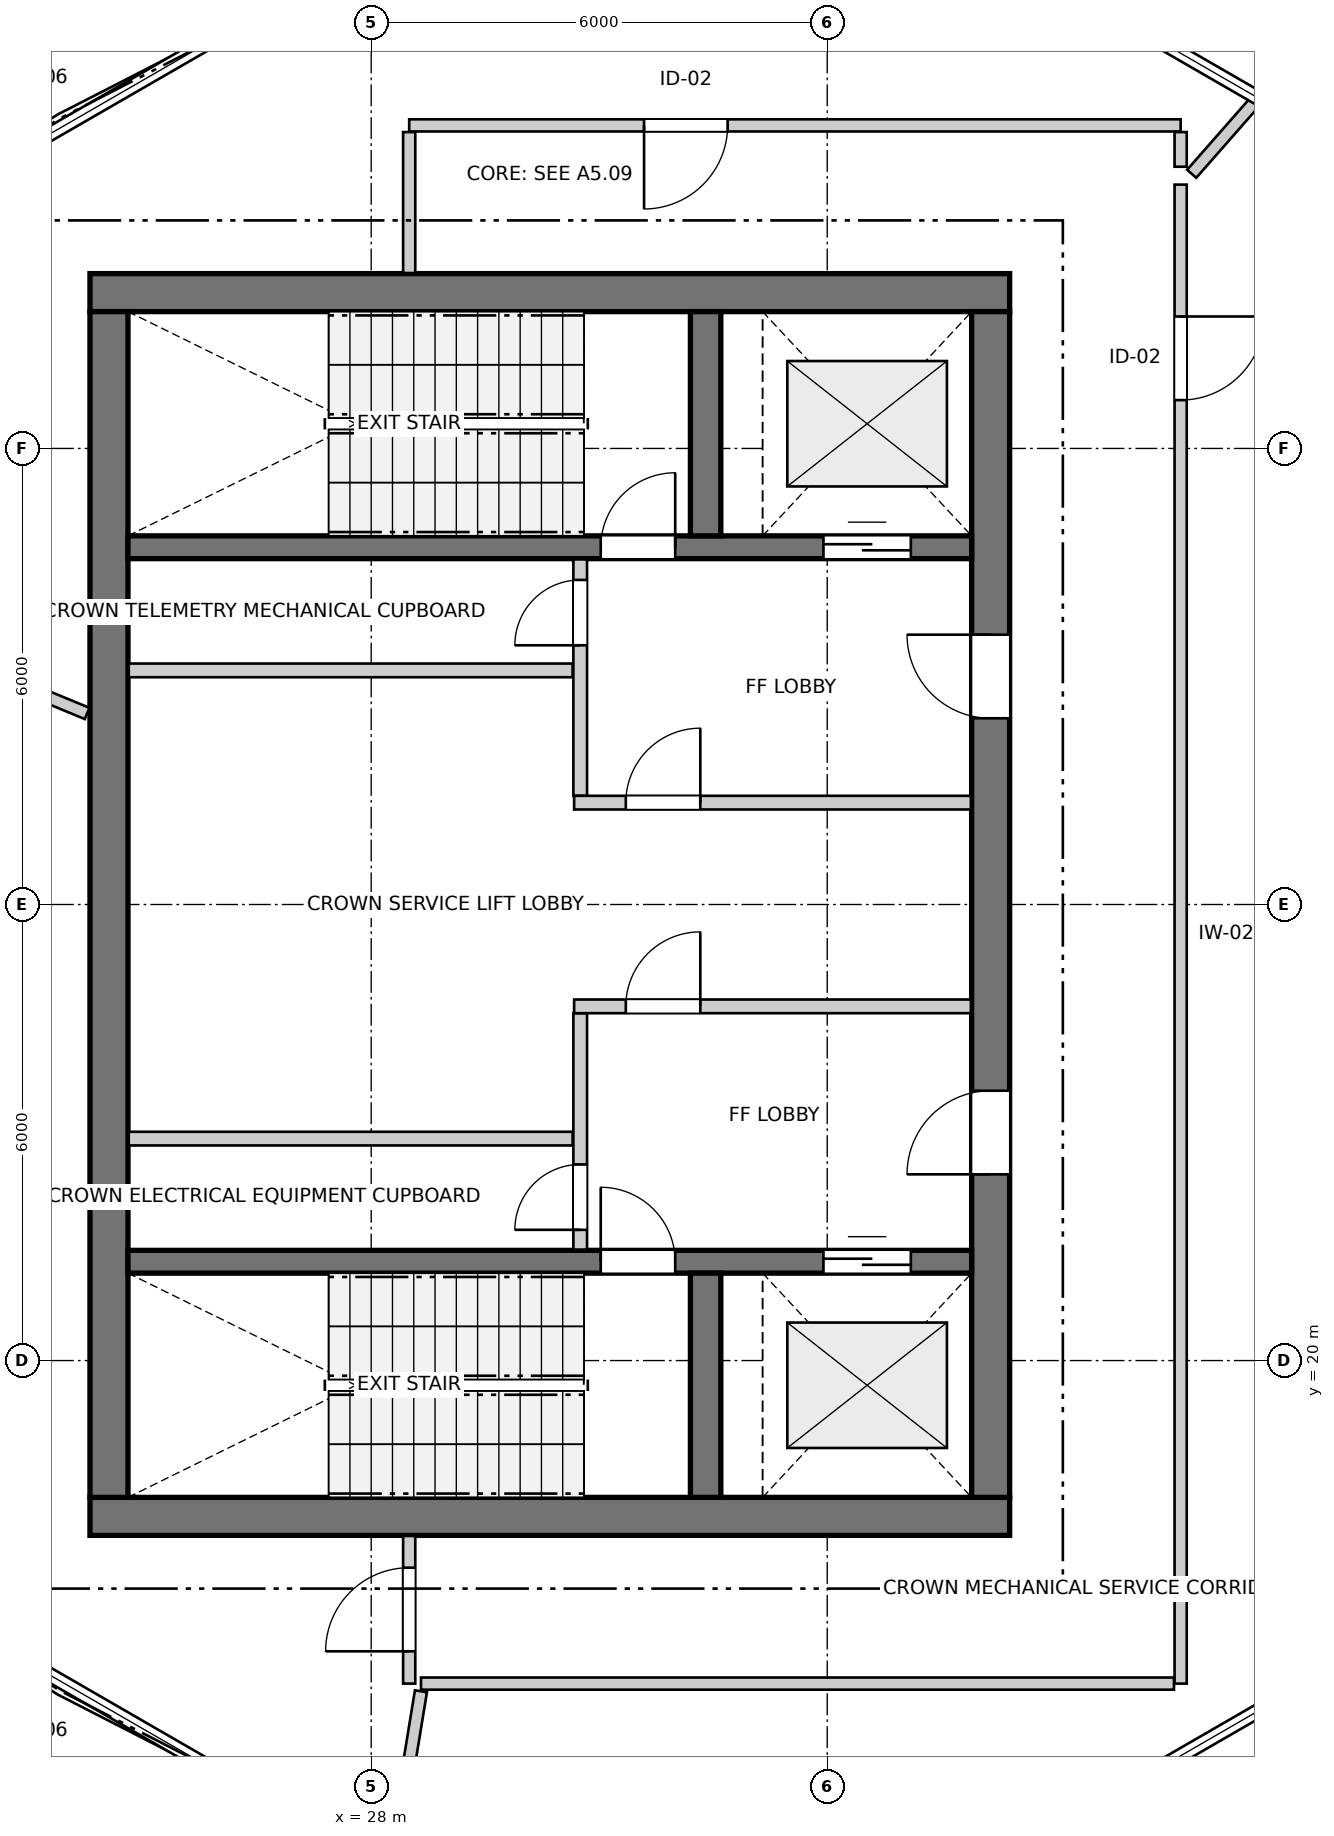
"""IFC4 building model, lengths in metres.
Left out: names, types, materials, properties, quantities, classifications, styles, units other than length and angle.
Written with IfcOpenShell. Run it as: python <this file> out.ifc"""

import sys

from ifc_helpers import new_model, si_unit, direction, frame, frame_2d, origin, place, context, subcontext, project, spatial, rectangle, extrude, source, transform, mapped, element, fill, save


model = new_model("IFC4")
c1 = context("Model", 3, precision=1e-05, world=origin(), true_north=direction((0.0, 1.0)))
c2 = subcontext(c1, "Body", "Model", "MODEL_VIEW")
j1 = project(units=[si_unit("LENGTHUNIT", "METRE"), si_unit("PLANEANGLEUNIT", "RADIAN")], contexts=[c1])
p1 = place(None, origin())
s1 = spatial("IfcSite", under=j1, at=p1, CompositionType="ELEMENT")
p2 = place(p1, origin())
s2 = spatial("IfcBuilding", under=s1, at=p2, CompositionType="ELEMENT")
p3 = place(p2, frame((0.0, 0.0, 266.1)))
s3 = spatial("IfcBuildingStorey", under=s2, at=p3, CompositionType="ELEMENT", Elevation=266.1)
for number, where, z_axis, x_axis in (
    (1, (24.3, 17.95, 0.0), (0.0, 0.0, 1.0), (1.0, 0.0, 0.0)),
    (2, (36.4, 34.05, 0.0), (0.0, 0.0, 1.0), (-1.0, 0.0, 0.0)),
):
    element("IfcWall", number, at=place(p3, frame(where, z_axis=z_axis, x_axis=x_axis)), inside=s3, PredefinedType="SHEAR", context=c2, shape_type="SweptSolid", body=[
        extrude(rectangle(XDim=12.1, YDim=0.5, at=frame_2d((6.05, 0.0))), origin(), (0.0, 0.0, 1.0), 4.05),
    ])
p4 = place(p3, frame((24.55, 33.8, 0.0), z_axis=(0.0, 0.0, 1.0), x_axis=(0.0, -1.0, 0.0)))
e3 = element("IfcWall", 3, at=p4, inside=s3, PredefinedType="SHEAR", context=c2, shape_type="SweptSolid", body=[
    extrude(rectangle(XDim=15.6, YDim=0.5, at=frame_2d((7.8, 0.0))), origin(), (0.0, 0.0, 1.0), 4.05),
])
p5 = place(p3, frame((36.15, 18.2, 0.0), z_axis=(0.0, 0.0, 1.0), x_axis=(0.0, 1.0, 0.0)))
e4 = element("IfcWall", 4, at=p5, inside=s3, PredefinedType="SHEAR", context=c2, shape_type="SweptSolid", body=[
    extrude(rectangle(XDim=15.6, YDim=0.5, at=frame_2d((7.8, 0.0))), origin(), (0.0, 0.0, 1.0), 4.05),
])
p6 = place(p5, frame((4.25, 0.0, 0.0)))
e5 = element("IfcOpeningElement", 5, at=p6, cuts=e4, PredefinedType="OPENING", context=c2, shape_type="SweptSolid", body=[
    extrude(rectangle(XDim=1.1, YDim=2.15, at=frame_2d((0.55, 1.075))), frame((0.0, 0.26, 0.0), z_axis=(0.0, -1.0, 0.0), x_axis=(1.0, 0.0, 0.0)), (0.0, 0.0, 1.0), 0.52),
])
p7 = place(p5, frame((10.25, 0.0, 0.0)))
e6 = element("IfcOpeningElement", 6, at=p7, cuts=e4, PredefinedType="OPENING", context=c2, shape_type="SweptSolid", body=[
    extrude(rectangle(XDim=1.1, YDim=2.15, at=frame_2d((0.55, 1.075))), frame((0.0, 0.26, 0.0), z_axis=(0.0, -1.0, 0.0), x_axis=(1.0, 0.0, 0.0)), (0.0, 0.0, 1.0), 0.52),
])
p8 = place(p3, frame((24.8, 21.3, 0.0), z_axis=(0.0, 0.0, 1.0), x_axis=(1.0, 0.0, 0.0)))
e7 = element("IfcWall", 7, at=p8, inside=s3, PredefinedType="SHEAR", context=c2, shape_type="SweptSolid", body=[
    extrude(rectangle(XDim=11.1, YDim=0.3, at=frame_2d((5.55, 0.0))), origin(), (0.0, 0.0, 1.0), 4.05),
])
p9 = place(p8, frame((6.22, 0.0, 0.0)))
e8 = element("IfcOpeningElement", 8, at=p9, cuts=e7, PredefinedType="OPENING", context=c2, shape_type="SweptSolid", body=[
    extrude(rectangle(XDim=0.98, YDim=2.15, at=frame_2d((0.49, 1.075))), frame((0.0, 0.16, 0.0), z_axis=(0.0, -1.0, 0.0), x_axis=(1.0, 0.0, 0.0)), (0.0, 0.0, 1.0), 0.32),
])
p10 = place(p8, frame((9.15, 0.0, 0.0)))
e9 = element("IfcOpeningElement", 9, at=p10, cuts=e7, PredefinedType="OPENING", context=c2, shape_type="SweptSolid", body=[
    extrude(rectangle(XDim=1.15, YDim=2.15, at=frame_2d((0.575, 1.075))), frame((0.0, 0.16, 0.0), z_axis=(0.0, -1.0, 0.0), x_axis=(1.0, 0.0, 0.0)), (0.0, 0.0, 1.0), 0.32),
])
p11 = place(p3, frame((32.4, 18.2, 0.0), z_axis=(0.0, 0.0, 1.0), x_axis=(0.0, 1.0, 0.0)))
e10 = element("IfcWall", 10, at=p11, inside=s3, PredefinedType="SHEAR", context=c2, shape_type="SweptSolid", body=[
    extrude(rectangle(XDim=2.95, YDim=0.4, at=frame_2d((1.475, 0.0))), origin(), (0.0, 0.0, 1.0), 4.05),
])
p12 = place(p3, frame((24.8, 30.7, 0.0), z_axis=(0.0, 0.0, 1.0), x_axis=(1.0, 0.0, 0.0)))
e11 = element("IfcWall", 11, at=p12, inside=s3, PredefinedType="SHEAR", context=c2, shape_type="SweptSolid", body=[
    extrude(rectangle(XDim=11.1, YDim=0.3, at=frame_2d((5.55, 0.0))), origin(), (0.0, 0.0, 1.0), 4.05),
])
p13 = place(p12, frame((6.22, 0.0, 0.0)))
e12 = element("IfcOpeningElement", 12, at=p13, cuts=e11, PredefinedType="OPENING", context=c2, shape_type="SweptSolid", body=[
    extrude(rectangle(XDim=0.98, YDim=2.15, at=frame_2d((0.49, 1.075))), frame((0.0, 0.16, 0.0), z_axis=(0.0, -1.0, 0.0), x_axis=(1.0, 0.0, 0.0)), (0.0, 0.0, 1.0), 0.32),
])
p14 = place(p12, frame((9.15, 0.0, 0.0)))
e13 = element("IfcOpeningElement", 13, at=p14, cuts=e11, PredefinedType="OPENING", context=c2, shape_type="SweptSolid", body=[
    extrude(rectangle(XDim=1.15, YDim=2.15, at=frame_2d((0.575, 1.075))), frame((0.0, 0.16, 0.0), z_axis=(0.0, -1.0, 0.0), x_axis=(1.0, 0.0, 0.0)), (0.0, 0.0, 1.0), 0.32),
])
p15 = place(p3, frame((32.4, 30.85, 0.0), z_axis=(0.0, 0.0, 1.0), x_axis=(0.0, 1.0, 0.0)))
e14 = element("IfcWall", 14, at=p15, inside=s3, PredefinedType="SHEAR", context=c2, shape_type="SweptSolid", body=[
    extrude(rectangle(XDim=2.95, YDim=0.4, at=frame_2d((1.475, 0.0))), origin(), (0.0, 0.0, 1.0), 4.05),
])
p16 = place(p3, frame((30.75, 21.46, 0.0), z_axis=(0.0, 0.0, 1.0), x_axis=(0.0, 1.0, 0.0)))
e15 = element("IfcWall", 15, at=p16, inside=s3, PredefinedType="PARTITIONING", context=c2, shape_type="SweptSolid", body=[
    extrude(rectangle(XDim=3.11, YDim=0.18, at=frame_2d((1.555, 0.0))), origin(), (0.0, 0.0, 1.0), 4.05),
])
p17 = place(p16, frame((0.26, 0.0, 0.0)))
e16 = element("IfcOpeningElement", 16, at=p17, cuts=e15, PredefinedType="OPENING", context=c2, shape_type="SweptSolid", body=[
    extrude(rectangle(XDim=0.86, YDim=2.05, at=frame_2d((0.43, 1.025))), frame((0.0, 0.1, 0.0), z_axis=(0.0, -1.0, 0.0), x_axis=(1.0, 0.0, 0.0)), (0.0, 0.0, 1.0), 0.2),
])
p18 = place(p3, frame((30.67, 24.66, 0.0), z_axis=(0.0, 0.0, 1.0), x_axis=(1.0, 0.0, 0.0)))
e17 = element("IfcWall", 17, at=p18, inside=s3, PredefinedType="PARTITIONING", context=c2, shape_type="SweptSolid", body=[
    extrude(rectangle(XDim=5.22, YDim=0.18, at=frame_2d((2.61, 0.0))), origin(), (0.0, 0.0, 1.0), 4.05),
])
p19 = place(p18, frame((0.68, 0.0, 0.0)))
e18 = element("IfcOpeningElement", 18, at=p19, cuts=e17, PredefinedType="OPENING", context=c2, shape_type="SweptSolid", body=[
    extrude(rectangle(XDim=0.98, YDim=2.15, at=frame_2d((0.49, 1.075))), frame((0.0, 0.1, 0.0), z_axis=(0.0, -1.0, 0.0), x_axis=(1.0, 0.0, 0.0)), (0.0, 0.0, 1.0), 0.2),
])
p20 = place(p3, frame((30.75, 27.43, 0.0), z_axis=(0.0, 0.0, 1.0), x_axis=(0.0, 1.0, 0.0)))
e19 = element("IfcWall", 19, at=p20, inside=s3, PredefinedType="PARTITIONING", context=c2, shape_type="SweptSolid", body=[
    extrude(rectangle(XDim=3.11, YDim=0.18, at=frame_2d((1.555, 0.0))), origin(), (0.0, 0.0, 1.0), 4.05),
])
p21 = place(p20, frame((1.98, 0.0, 0.0)))
e20 = element("IfcOpeningElement", 20, at=p21, cuts=e19, PredefinedType="OPENING", context=c2, shape_type="SweptSolid", body=[
    extrude(rectangle(XDim=0.86, YDim=2.05, at=frame_2d((0.43, 1.025))), frame((0.0, 0.1, 0.0), z_axis=(0.0, -1.0, 0.0), x_axis=(1.0, 0.0, 0.0)), (0.0, 0.0, 1.0), 0.2),
])
p22 = place(p3, frame((30.67, 27.34, 0.0), z_axis=(0.0, 0.0, 1.0), x_axis=(1.0, 0.0, 0.0)))
e21 = element("IfcWall", 21, at=p22, inside=s3, PredefinedType="PARTITIONING", context=c2, shape_type="SweptSolid", body=[
    extrude(rectangle(XDim=5.22, YDim=0.18, at=frame_2d((2.61, 0.0))), origin(), (0.0, 0.0, 1.0), 4.05),
])
p23 = place(p22, frame((0.68, 0.0, 0.0)))
e22 = element("IfcOpeningElement", 22, at=p23, cuts=e21, PredefinedType="OPENING", context=c2, shape_type="SweptSolid", body=[
    extrude(rectangle(XDim=0.98, YDim=2.15, at=frame_2d((0.49, 1.075))), frame((0.0, 0.1, 0.0), z_axis=(0.0, -1.0, 0.0), x_axis=(1.0, 0.0, 0.0)), (0.0, 0.0, 1.0), 0.2),
])
for number, where, z_axis, x_axis in (
    (23, (24.81, 22.92, 0.0), (0.0, 0.0, 1.0), (1.0, 0.0, 0.0)),
    (24, (24.81, 29.08, 0.0), (0.0, 0.0, 1.0), (1.0, 0.0, 0.0)),
):
    element("IfcWall", number, at=place(p3, frame(where, z_axis=z_axis, x_axis=x_axis)), inside=s3, PredefinedType="PARTITIONING", context=c2, shape_type="SweptSolid", body=[
        extrude(rectangle(XDim=5.84, YDim=0.18, at=frame_2d((2.92, 0.0))), origin(), (0.0, 0.0, 1.0), 4.05),
    ])
p24 = place(p3, frame((38.65, 35.471, 0.0), z_axis=(0.0, 0.0, 1.0), x_axis=(0.0, -1.0, 0.0)))
e25 = element("IfcWall", 25, at=p24, inside=s3, PredefinedType="PARTITIONING", context=c2, shape_type="SweptSolid", body=[
    extrude(rectangle(XDim=19.721, YDim=0.16, at=frame_2d((9.86, 0.0))), origin(), (0.0, 0.0, 1.0), 4.05),
])
p25 = place(p24, frame((1.735, 0.0, 0.0)))
e26 = element("IfcOpeningElement", 26, at=p25, cuts=e25, PredefinedType="OPENING", context=c2, shape_type="SweptSolid", body=[
    extrude(rectangle(XDim=1.1, YDim=2.15, at=frame_2d((0.55, 1.075))), frame((0.0, 0.09, 0.0), z_axis=(0.0, -1.0, 0.0), x_axis=(1.0, 0.0, 0.0)), (0.0, 0.0, 1.0), 0.18),
])
p26 = place(p3, frame((38.65, 36.25, 0.0), z_axis=(0.0, 0.0, 1.0), x_axis=(-1.0, 0.0, 0.0)))
e27 = element("IfcWall", 27, at=p26, inside=s3, PredefinedType="PARTITIONING", context=c2, shape_type="SweptSolid", body=[
    extrude(rectangle(XDim=10.15, YDim=0.16, at=frame_2d((5.075, 0.0))), origin(), (0.0, 0.0, 1.0), 4.05),
])
p27 = place(p26, frame((5.96, 0.0, 0.0)))
e28 = element("IfcOpeningElement", 28, at=p27, cuts=e27, PredefinedType="OPENING", context=c2, shape_type="SweptSolid", body=[
    extrude(rectangle(XDim=1.1, YDim=2.15, at=frame_2d((0.55, 1.075))), frame((0.0, 0.09, 0.0), z_axis=(0.0, -1.0, 0.0), x_axis=(1.0, 0.0, 0.0)), (0.0, 0.0, 1.0), 0.18),
])
p28 = place(p3, frame((28.5, 15.75, 0.0), z_axis=(0.0, 0.0, 1.0), x_axis=(0.0, 1.0, 0.0)))
e29 = element("IfcWall", 29, at=p28, inside=s3, PredefinedType="PARTITIONING", context=c2, shape_type="SweptSolid", body=[
    extrude(rectangle(XDim=1.942, YDim=0.16, at=frame_2d((0.971, 0.0))), origin(), (0.0, 0.0, 1.0), 3.318),
])
p29 = place(p28, frame((0.425, 0.0, 0.0)))
e30 = element("IfcOpeningElement", 30, at=p29, cuts=e29, PredefinedType="OPENING", context=c2, shape_type="SweptSolid", body=[
    extrude(rectangle(XDim=1.1, YDim=2.15, at=frame_2d((0.55, 1.075))), frame((0.0, 0.09, 0.0), z_axis=(0.0, -1.0, 0.0), x_axis=(1.0, 0.0, 0.0)), (0.0, 0.0, 1.0), 0.18),
])
p30 = place(p3, frame((28.655, 15.75, 0.0), z_axis=(0.0, 0.0, 1.0), x_axis=(1.0, 0.0, 0.0)))
e31 = element("IfcWall", 31, at=p30, inside=s3, PredefinedType="PARTITIONING", context=c2, shape_type="SweptSolid", body=[
    extrude(rectangle(XDim=9.907, YDim=0.16, at=frame_2d((4.954, 0.0))), origin(), (0.0, 0.0, 1.0), 4.05),
])
p31 = place(p3, frame((17.407, 31.344, 0.0), z_axis=(0.0, 0.0, 1.0), x_axis=(0.92431974827, -0.381618923743, 0.0)))
e32 = element("IfcWall", 32, at=p31, inside=s3, PredefinedType="PARTITIONING", context=c2, shape_type="SweptSolid", body=[
    extrude(rectangle(XDim=7.416, YDim=0.16, at=frame_2d((3.708, 0.0))), origin(), (0.0, 0.0, 1.0), 4.05),
])
p32 = place(p3, frame((28.319, 13.603, 0.0), z_axis=(0.0, 0.0, 1.0), x_axis=(0.161630316239, 0.986851377297, 0.0)))
e33 = element("IfcWall", 33, at=p32, inside=s3, PredefinedType="PARTITIONING", context=c2, shape_type="SweptSolid", body=[
    extrude(rectangle(XDim=2.074, YDim=0.16, at=frame_2d((1.037, 0.0))), origin(), (0.0, 0.0, 1.0), 4.05),
])
p33 = place(p3, frame((28.5, 34.308, 0.0), z_axis=(0.0, 0.0, 1.0), x_axis=(0.0, 1.0, 0.0)))
e34 = element("IfcWall", 34, at=p33, inside=s3, PredefinedType="PARTITIONING", context=c2, shape_type="SweptSolid", body=[
    extrude(rectangle(XDim=1.854, YDim=0.16, at=frame_2d((0.927, 0.0))), origin(), (0.0, 0.0, 1.0), 3.318),
])
p34 = place(p3, frame((38.795, 35.614, 0.0), z_axis=(0.0, 0.0, 1.0), x_axis=(0.659905949222, 0.751348213667, 0.0)))
e35 = element("IfcWall", 35, at=p34, inside=s3, PredefinedType="PARTITIONING", context=c2, shape_type="SweptSolid", body=[
    extrude(rectangle(XDim=1.701, YDim=0.16, at=frame_2d((0.85, 0.0))), origin(), (0.0, 0.0, 1.0), 4.05),
])
p35 = place(p3, frame((38.65, 35.706, 0.0), z_axis=(0.0, 0.0, 1.0), x_axis=(0.0, 1.0, 0.0)))
e36 = element("IfcWall", 36, at=p35, inside=s3, PredefinedType="PARTITIONING", context=c2, shape_type="SweptSolid", body=[
    extrude(rectangle(XDim=0.456, YDim=0.16, at=frame_2d((0.228, 0.0))), origin(), (0.0, 0.0, 1.0), 4.05),
])
m1 = source(origin(), c2, "Body", "SweptSolid", [
    extrude(rectangle(XDim=0.98, YDim=2.15, at=frame_2d((0.49, 1.075))), frame((0.0, 0.025, 0.0), z_axis=(0.0, -1.0, 0.0), x_axis=(1.0, 0.0, 0.0)), (0.0, 0.0, 1.0), 0.05),
])
p36 = place(p9, origin())
e37 = element("IfcDoor", 37, at=p36, inside=s3, OperationType="SINGLE_SWING_LEFT", PredefinedType="DOOR", context=c2, shape_type="MappedRepresentation", body=[
    mapped(m1, transform((0.0, 0.0, 0.0), x_axis=(1.0, 0.0, 0.0), y_axis=(0.0, 1.0, 0.0), z_axis=(0.0, 0.0, 1.0), scale=1.0)),
])
fill(e8, e37)
m2 = source(origin(), c2, "Body", "SweptSolid", [
    extrude(rectangle(XDim=1.15, YDim=2.15, at=frame_2d((0.575, 1.075))), frame((0.0, 0.025, 0.0), z_axis=(0.0, -1.0, 0.0), x_axis=(1.0, 0.0, 0.0)), (0.0, 0.0, 1.0), 0.05),
])
p37 = place(p10, origin())
e38 = element("IfcDoor", 38, at=p37, inside=s3, OperationType="DOUBLE_DOOR_SLIDING", PredefinedType="DOOR", context=c2, shape_type="MappedRepresentation", body=[
    mapped(m2, transform((0.0, 0.0, 0.0), x_axis=(1.0, 0.0, 0.0), y_axis=(0.0, 1.0, 0.0), z_axis=(0.0, 0.0, 1.0), scale=1.0)),
])
fill(e9, e38)
p38 = place(p13, origin())
e39 = element("IfcDoor", 39, at=p38, inside=s3, OperationType="SINGLE_SWING_RIGHT", PredefinedType="DOOR", context=c2, shape_type="MappedRepresentation", body=[
    mapped(m1, transform((0.0, 0.0, 0.0), x_axis=(1.0, 0.0, 0.0), y_axis=(0.0, 1.0, 0.0), z_axis=(0.0, 0.0, 1.0), scale=1.0)),
])
fill(e12, e39)
p39 = place(p14, origin())
e40 = element("IfcDoor", 40, at=p39, inside=s3, OperationType="DOUBLE_DOOR_SLIDING", PredefinedType="DOOR", context=c2, shape_type="MappedRepresentation", body=[
    mapped(m2, transform((0.0, 0.0, 0.0), x_axis=(1.0, 0.0, 0.0), y_axis=(0.0, 1.0, 0.0), z_axis=(0.0, 0.0, 1.0), scale=1.0)),
])
fill(e13, e40)
m3 = source(origin(), c2, "Body", "SweptSolid", [
    extrude(rectangle(XDim=1.1, YDim=2.15, at=frame_2d((0.55, 1.075))), frame((0.0, 0.025, 0.0), z_axis=(0.0, -1.0, 0.0), x_axis=(1.0, 0.0, 0.0)), (0.0, 0.0, 1.0), 0.05),
])
p40 = place(p6, origin())
e41 = element("IfcDoor", 41, at=p40, inside=s3, OperationType="SINGLE_SWING_LEFT", PredefinedType="DOOR", context=c2, shape_type="MappedRepresentation", body=[
    mapped(m3, transform((0.0, 0.0, 0.0), x_axis=(1.0, 0.0, 0.0), y_axis=(0.0, 1.0, 0.0), z_axis=(0.0, 0.0, 1.0), scale=1.0)),
])
fill(e5, e41)
p41 = place(p7, origin())
e42 = element("IfcDoor", 42, at=p41, inside=s3, OperationType="SINGLE_SWING_RIGHT", PredefinedType="DOOR", context=c2, shape_type="MappedRepresentation", body=[
    mapped(m3, transform((0.0, 0.0, 0.0), x_axis=(1.0, 0.0, 0.0), y_axis=(0.0, 1.0, 0.0), z_axis=(0.0, 0.0, 1.0), scale=1.0)),
])
fill(e6, e42)
m4 = source(origin(), c2, "Body", "SweptSolid", [
    extrude(rectangle(XDim=0.86, YDim=2.05, at=frame_2d((0.43, 1.025))), frame((0.0, 0.025, 0.0), z_axis=(0.0, -1.0, 0.0), x_axis=(1.0, 0.0, 0.0)), (0.0, 0.0, 1.0), 0.05),
])
p42 = place(p17, origin())
e43 = element("IfcDoor", 43, at=p42, inside=s3, OperationType="SINGLE_SWING_LEFT", PredefinedType="DOOR", context=c2, shape_type="MappedRepresentation", body=[
    mapped(m4, transform((0.0, 0.0, 0.0), x_axis=(1.0, 0.0, 0.0), y_axis=(0.0, 1.0, 0.0), z_axis=(0.0, 0.0, 1.0), scale=1.0)),
])
fill(e16, e43)
p43 = place(p19, origin())
e44 = element("IfcDoor", 44, at=p43, inside=s3, OperationType="SINGLE_SWING_RIGHT", PredefinedType="DOOR", context=c2, shape_type="MappedRepresentation", body=[
    mapped(m1, transform((0.0, 0.0, 0.0), x_axis=(1.0, 0.0, 0.0), y_axis=(0.0, 1.0, 0.0), z_axis=(0.0, 0.0, 1.0), scale=1.0)),
])
fill(e18, e44)
p44 = place(p21, origin())
e45 = element("IfcDoor", 45, at=p44, inside=s3, OperationType="SINGLE_SWING_LEFT", PredefinedType="DOOR", context=c2, shape_type="MappedRepresentation", body=[
    mapped(m4, transform((0.0, 0.0, 0.0), x_axis=(1.0, 0.0, 0.0), y_axis=(0.0, 1.0, 0.0), z_axis=(0.0, 0.0, 1.0), scale=1.0)),
])
fill(e20, e45)
p45 = place(p23, origin())
e46 = element("IfcDoor", 46, at=p45, inside=s3, OperationType="SINGLE_SWING_RIGHT", PredefinedType="DOOR", context=c2, shape_type="MappedRepresentation", body=[
    mapped(m1, transform((0.0, 0.0, 0.0), x_axis=(1.0, 0.0, 0.0), y_axis=(0.0, 1.0, 0.0), z_axis=(0.0, 0.0, 1.0), scale=1.0)),
])
fill(e22, e46)
p46 = place(p25, origin())
e47 = element("IfcDoor", 47, at=p46, inside=s3, OperationType="SINGLE_SWING_LEFT", PredefinedType="DOOR", context=c2, shape_type="MappedRepresentation", body=[
    mapped(m3, transform((0.0, 0.0, 0.0), x_axis=(1.0, 0.0, 0.0), y_axis=(0.0, 1.0, 0.0), z_axis=(0.0, 0.0, 1.0), scale=1.0)),
])
fill(e26, e47)
p47 = place(p27, origin())
e48 = element("IfcDoor", 48, at=p47, inside=s3, OperationType="SINGLE_SWING_RIGHT", PredefinedType="DOOR", context=c2, shape_type="MappedRepresentation", body=[
    mapped(m3, transform((0.0, 0.0, 0.0), x_axis=(1.0, 0.0, 0.0), y_axis=(0.0, 1.0, 0.0), z_axis=(0.0, 0.0, 1.0), scale=1.0)),
])
fill(e28, e48)
p48 = place(p29, origin())
e49 = element("IfcDoor", 49, at=p48, inside=s3, OperationType="SINGLE_SWING_LEFT", PredefinedType="DOOR", context=c2, shape_type="MappedRepresentation", body=[
    mapped(m3, transform((0.0, 0.0, 0.0), x_axis=(1.0, 0.0, 0.0), y_axis=(0.0, 1.0, 0.0), z_axis=(0.0, 0.0, 1.0), scale=1.0)),
])
fill(e30, e49)
save(model, sys.argv[1])
